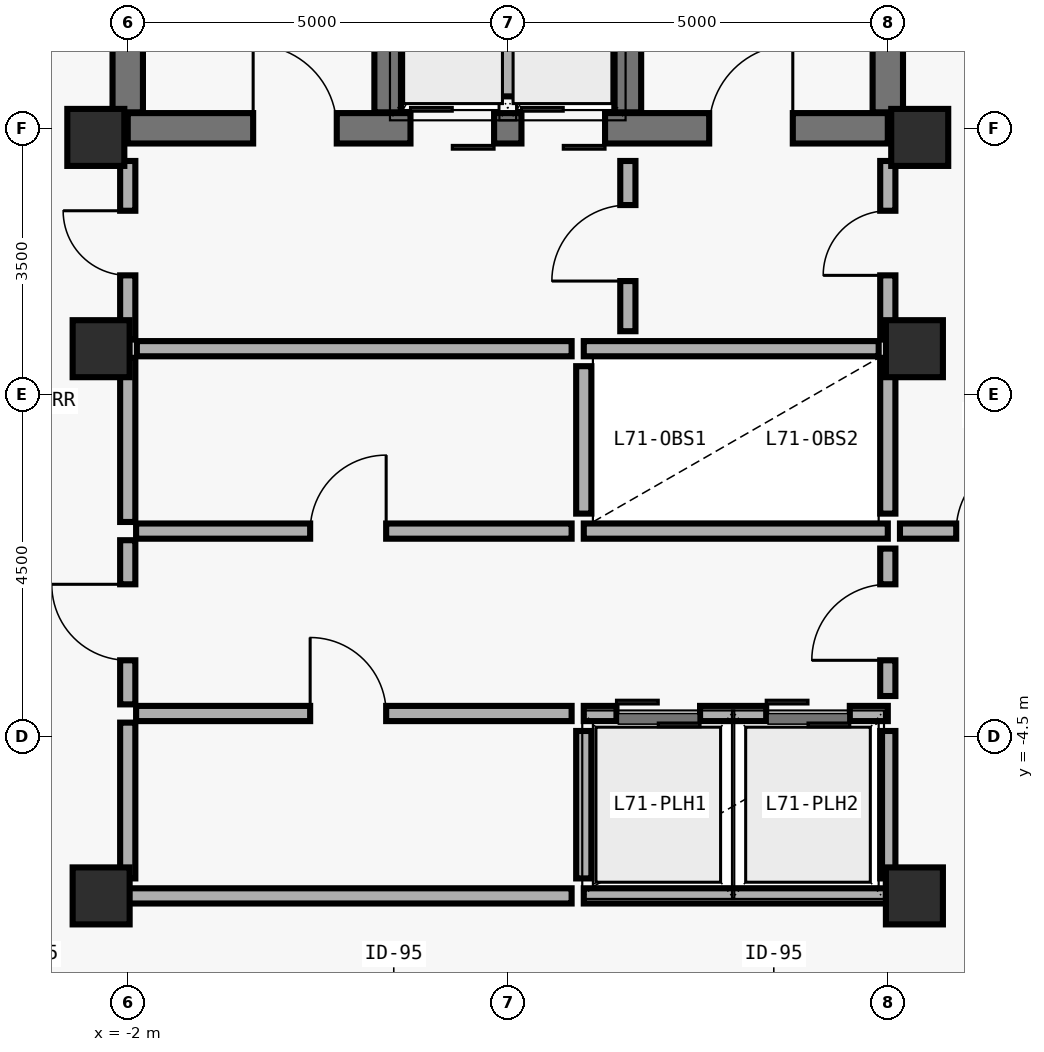
"""IFC4 building model, lengths in metres.
Left out: names, types, materials, properties, quantities, classifications, styles, units other than length and angle.
Written with IfcOpenShell. Run it as: python <this file> out.ifc"""

import sys

from ifc_helpers import new_model, si_unit, direction, frame, frame_2d, origin, origin_2d, place, context, subcontext, project, spatial, rectangle, extrude, element, fill, save


model = new_model("IFC4")
c1 = context("Model", 3, precision=1e-05, world=origin(), true_north=direction((0.0, 1.0)))
c2 = subcontext(c1, "Body", "Model", "MODEL_VIEW")
j1 = project(units=[si_unit("LENGTHUNIT", "METRE"), si_unit("PLANEANGLEUNIT", "RADIAN")], contexts=[c1])
p1 = place(None, origin())
s1 = spatial("IfcSite", under=j1, at=p1, CompositionType="ELEMENT")
p2 = place(p1, origin())
s2 = spatial("IfcBuilding", under=s1, at=p2, CompositionType="ELEMENT")
p3 = place(p2, frame((0.0, 0.0, 277.8)))
s3 = spatial("IfcBuildingStorey", under=s2, at=p3, CompositionType="ELEMENT", Elevation=277.8)
p4 = place(p3, frame((-2.0, 3.5, 0.0), z_axis=(0.0, 0.0, 1.0), x_axis=(1.0, 0.0, 0.0)))
e1 = element("IfcWall", 1, at=p4, inside=s3, PredefinedType="SHEAR", context=c2, shape_type="SweptSolid", body=[
    extrude(rectangle(XDim=10.0, YDim=0.4, at=frame_2d((5.0, 0.0))), origin(), (0.0, 0.0, 1.0), 3.592),
])
p5 = place(p4, frame((1.65, 0.0, 0.0)))
e2 = element("IfcOpeningElement", 2, at=p5, cuts=e1, PredefinedType="OPENING", context=c2, shape_type="SweptSolid", body=[
    extrude(rectangle(XDim=1.1, YDim=2.15, at=frame_2d((0.55, 1.075))), frame((0.0, 0.21, 0.0), z_axis=(0.0, -1.0, 0.0), x_axis=(1.0, 0.0, 0.0)), (0.0, 0.0, 1.0), 0.42),
])
p6 = place(p4, frame((7.65, 0.0, 0.0)))
e3 = element("IfcOpeningElement", 3, at=p6, cuts=e1, PredefinedType="OPENING", context=c2, shape_type="SweptSolid", body=[
    extrude(rectangle(XDim=1.1, YDim=2.15, at=frame_2d((0.55, 1.075))), frame((0.0, 0.21, 0.0), z_axis=(0.0, -1.0, 0.0), x_axis=(1.0, 0.0, 0.0)), (0.0, 0.0, 1.0), 0.42),
])
p7 = place(p4, frame((3.72, 0.0, 0.0)))
e4 = element("IfcOpeningElement", 4, at=p7, cuts=e1, PredefinedType="OPENING", context=c2, shape_type="SweptSolid", body=[
    extrude(rectangle(XDim=1.1, YDim=2.2, at=frame_2d((0.55, 1.1))), frame((0.0, 0.21, 0.0), z_axis=(0.0, -1.0, 0.0), x_axis=(1.0, 0.0, 0.0)), (0.0, 0.0, 1.0), 0.42),
])
p8 = place(p4, frame((5.18, 0.0, 0.0)))
e5 = element("IfcOpeningElement", 5, at=p8, cuts=e1, PredefinedType="OPENING", context=c2, shape_type="SweptSolid", body=[
    extrude(rectangle(XDim=1.1, YDim=2.2, at=frame_2d((0.55, 1.1))), frame((0.0, 0.21, 0.0), z_axis=(0.0, -1.0, 0.0), x_axis=(1.0, 0.0, 0.0)), (0.0, 0.0, 1.0), 0.42),
])
for number, where, z_axis, x_axis in (
    (6, (-2.0, 3.71, 0.0), (0.0, 0.0, 1.0), (0.0, 1.0, 0.0)),
    (7, (8.0, 3.71, 0.0), (0.0, 0.0, 1.0), (0.0, 1.0, 0.0)),
):
    element("IfcWall", number, at=place(p3, frame(where, z_axis=z_axis, x_axis=x_axis)), inside=s3, PredefinedType="SHEAR", context=c2, shape_type="SweptSolid", body=[
        extrude(rectangle(XDim=8.58, YDim=0.4, at=frame_2d((4.29, 0.0))), origin(), (0.0, 0.0, 1.0), 3.592),
    ])
for number, where, z_axis, x_axis in (
    (8, (1.42, 3.71, 0.0), (0.0, 0.0, 1.0), (0.0, 1.0, 0.0)),
    (9, (4.58, 3.71, 0.0), (0.0, 0.0, 1.0), (0.0, 1.0, 0.0)),
):
    element("IfcWall", number, at=place(p3, frame(where, z_axis=z_axis, x_axis=x_axis)), inside=s3, PredefinedType="SHEAR", context=c2, shape_type="SweptSolid", body=[
        extrude(rectangle(XDim=8.58, YDim=0.35, at=frame_2d((4.29, 0.0))), origin(), (0.0, 0.0, 1.0), 3.592),
    ])
for number, where, z_axis, x_axis in (
    (10, (-2.42, 3.38, 0.0), (0.0, 0.0, 1.0), (1.0, 0.0, 0.0)),
    (11, (8.42, 3.38, 0.0), (0.0, 0.0, 1.0), (1.0, 0.0, 0.0)),
    (12, (-2.35, 0.6, 0.0), (0.0, 0.0, 1.0), (1.0, 0.0, 0.0)),
    (13, (8.35, 0.6, 0.0), (0.0, 0.0, 1.0), (1.0, 0.0, 0.0)),
    (14, (-2.35, -6.6, 0.0), (0.0, 0.0, 1.0), (1.0, 0.0, 0.0)),
    (15, (8.35, -6.6, 0.0), (0.0, 0.0, 1.0), (1.0, 0.0, 0.0)),
):
    element("IfcColumn", number, at=place(p3, frame(where, z_axis=z_axis, x_axis=x_axis)), inside=s3, PredefinedType="COLUMN", context=c2, shape_type="SweptSolid", body=[
        extrude(rectangle(XDim=0.75, YDim=0.75, at=origin_2d()), origin(), (0.0, 0.0, 1.0), 3.575),
    ])
p9 = place(p3, frame((3.0, 3.92, 0.0), z_axis=(0.0, 0.0, 1.0), x_axis=(0.0, 1.0, 0.0)))
e16 = element("IfcWall", 16, at=p9, inside=s3, PredefinedType="SOLIDWALL", context=c2, shape_type="SweptSolid", body=[
    extrude(rectangle(XDim=2.03, YDim=0.2, at=frame_2d((1.015, 0.0))), origin(), (0.0, 0.0, 1.0), 3.36),
])
p10 = place(p3, frame((4.0, 0.6, 0.0), z_axis=(0.0, 0.0, 1.0), x_axis=(1.0, 0.0, 0.0)))
e17 = element("IfcWall", 17, at=p10, inside=s3, PredefinedType="SOLIDWALL", context=c2, shape_type="SweptSolid", body=[
    extrude(rectangle(XDim=3.88, YDim=0.2, at=frame_2d((1.94, 0.0))), origin(), (0.0, 0.0, 1.0), 3.072),
])
p11 = place(p3, frame((4.0, -1.8, 0.0), z_axis=(0.0, 0.0, 1.0), x_axis=(1.0, 0.0, 0.0)))
e18 = element("IfcWall", 18, at=p11, inside=s3, PredefinedType="SOLIDWALL", context=c2, shape_type="SweptSolid", body=[
    extrude(rectangle(XDim=4.0, YDim=0.2, at=frame_2d((2.0, 0.0))), origin(), (0.0, 0.0, 1.0), 3.36),
])
p12 = place(p3, frame((4.0, -1.57, 0.0), z_axis=(0.0, 0.0, 1.0), x_axis=(0.0, 1.0, 0.0)))
e19 = element("IfcWall", 19, at=p12, inside=s3, PredefinedType="SOLIDWALL", context=c2, shape_type="SweptSolid", body=[
    extrude(rectangle(XDim=1.94, YDim=0.2, at=frame_2d((0.97, 0.0))), origin(), (0.0, 0.0, 1.0), 3.36),
])
p13 = place(p3, frame((8.0, -1.57, 0.0), z_axis=(0.0, 0.0, 1.0), x_axis=(0.0, 1.0, 0.0)))
e20 = element("IfcWall", 20, at=p13, inside=s3, PredefinedType="SOLIDWALL", context=c2, shape_type="SweptSolid", body=[
    extrude(rectangle(XDim=2.05, YDim=0.2, at=frame_2d((1.025, 0.0))), origin(), (0.0, 0.0, 1.0), 3.072),
])
p14 = place(p3, frame((4.0, -4.2, 0.0), z_axis=(0.0, 0.0, 1.0), x_axis=(1.0, 0.0, 0.0)))
e21 = element("IfcWall", 21, at=p14, inside=s3, PredefinedType="SOLIDWALL", context=c2, shape_type="SweptSolid", body=[
    extrude(rectangle(XDim=4.0, YDim=0.2, at=frame_2d((2.0, 0.0))), origin(), (0.0, 0.0, 1.0), 3.36),
])
p15 = place(p14, frame((0.43, 0.0, 0.0)))
e22 = element("IfcOpeningElement", 22, at=p15, cuts=e21, PredefinedType="OPENING", context=c2, shape_type="SweptSolid", body=[
    extrude(rectangle(XDim=1.1, YDim=2.2, at=frame_2d((0.55, 1.1))), frame((0.0, 0.11, 0.0), z_axis=(0.0, -1.0, 0.0), x_axis=(1.0, 0.0, 0.0)), (0.0, 0.0, 1.0), 0.22),
])
p16 = place(p14, frame((2.4, 0.0, 0.0)))
e23 = element("IfcOpeningElement", 23, at=p16, cuts=e21, PredefinedType="OPENING", context=c2, shape_type="SweptSolid", body=[
    extrude(rectangle(XDim=1.1, YDim=2.2, at=frame_2d((0.55, 1.1))), frame((0.0, 0.11, 0.0), z_axis=(0.0, -1.0, 0.0), x_axis=(1.0, 0.0, 0.0)), (0.0, 0.0, 1.0), 0.22),
])
p17 = place(p3, frame((4.0, -6.6, 0.0), z_axis=(0.0, 0.0, 1.0), x_axis=(1.0, 0.0, 0.0)))
e24 = element("IfcWall", 24, at=p17, inside=s3, PredefinedType="SOLIDWALL", context=c2, shape_type="SweptSolid", body=[
    extrude(rectangle(XDim=4.0, YDim=0.2, at=frame_2d((2.0, 0.0))), origin(), (0.0, 0.0, 1.0), 3.072),
])
p18 = place(p3, frame((4.0, -6.37, 0.0), z_axis=(0.0, 0.0, 1.0), x_axis=(0.0, 1.0, 0.0)))
e25 = element("IfcWall", 25, at=p18, inside=s3, PredefinedType="SOLIDWALL", context=c2, shape_type="SweptSolid", body=[
    extrude(rectangle(XDim=1.94, YDim=0.2, at=frame_2d((0.97, 0.0))), origin(), (0.0, 0.0, 1.0), 3.36),
])
p19 = place(p3, frame((8.0, -6.37, 0.0), z_axis=(0.0, 0.0, 1.0), x_axis=(0.0, 1.0, 0.0)))
e26 = element("IfcWall", 26, at=p19, inside=s3, PredefinedType="SOLIDWALL", context=c2, shape_type="SweptSolid", body=[
    extrude(rectangle(XDim=1.94, YDim=0.2, at=frame_2d((0.97, 0.0))), origin(), (0.0, 0.0, 1.0), 3.072),
])
p20 = place(p3, frame((4.58, 0.83, 0.0), z_axis=(0.0, 0.0, 1.0), x_axis=(0.0, 1.0, 0.0)))
e27 = element("IfcWall", 27, at=p20, inside=s3, PredefinedType="MOVABLE", context=c2, shape_type="SweptSolid", body=[
    extrude(rectangle(XDim=2.24, YDim=0.2, at=frame_2d((1.12, 0.0))), origin(), (0.0, 0.0, 1.0), 3.36),
])
p21 = place(p20, frame((0.66, 0.0, 0.0)))
e28 = element("IfcOpeningElement", 28, at=p21, cuts=e27, PredefinedType="OPENING", context=c2, shape_type="SweptSolid", body=[
    extrude(rectangle(XDim=1.0, YDim=2.1, at=frame_2d((0.5, 1.05))), frame((0.0, 0.11, 0.0), z_axis=(0.0, -1.0, 0.0), x_axis=(1.0, 0.0, 0.0)), (0.0, 0.0, 1.0), 0.22),
])
p22 = place(p3, frame((-2.0, 0.72, 0.0), z_axis=(0.0, 0.0, 1.0), x_axis=(0.0, 1.0, 0.0)))
e29 = element("IfcWall", 29, at=p22, inside=s3, PredefinedType="MOVABLE", context=c2, shape_type="SweptSolid", body=[
    extrude(rectangle(XDim=2.35, YDim=0.2, at=frame_2d((1.175, 0.0))), origin(), (0.0, 0.0, 1.0), 2.692),
])
p23 = place(p22, frame((0.845, 0.0, 0.0)))
e30 = element("IfcOpeningElement", 30, at=p23, cuts=e29, PredefinedType="OPENING", context=c2, shape_type="SweptSolid", body=[
    extrude(rectangle(XDim=0.85, YDim=2.1, at=frame_2d((0.425, 1.05))), frame((0.0, 0.11, 0.0), z_axis=(0.0, -1.0, 0.0), x_axis=(1.0, 0.0, 0.0)), (0.0, 0.0, 1.0), 0.22),
])
p24 = place(p3, frame((8.0, 0.72, 0.0), z_axis=(0.0, 0.0, 1.0), x_axis=(0.0, 1.0, 0.0)))
e31 = element("IfcWall", 31, at=p24, inside=s3, PredefinedType="MOVABLE", context=c2, shape_type="SweptSolid", body=[
    extrude(rectangle(XDim=2.35, YDim=0.2, at=frame_2d((1.175, 0.0))), origin(), (0.0, 0.0, 1.0), 2.692),
])
p25 = place(p24, frame((0.845, 0.0, 0.0)))
e32 = element("IfcOpeningElement", 32, at=p25, cuts=e31, PredefinedType="OPENING", context=c2, shape_type="SweptSolid", body=[
    extrude(rectangle(XDim=0.85, YDim=2.1, at=frame_2d((0.425, 1.05))), frame((0.0, 0.11, 0.0), z_axis=(0.0, -1.0, 0.0), x_axis=(1.0, 0.0, 0.0)), (0.0, 0.0, 1.0), 0.22),
])
p26 = place(p3, frame((-2.0, -4.08, 0.0), z_axis=(0.0, 0.0, 1.0), x_axis=(0.0, 1.0, 0.0)))
e33 = element("IfcWall", 33, at=p26, inside=s3, PredefinedType="MOVABLE", context=c2, shape_type="SweptSolid", body=[
    extrude(rectangle(XDim=2.16, YDim=0.2, at=frame_2d((1.08, 0.0))), origin(), (0.0, 0.0, 1.0), 3.072),
])
p27 = place(p26, frame((0.58, 0.0, 0.0)))
e34 = element("IfcOpeningElement", 34, at=p27, cuts=e33, PredefinedType="OPENING", context=c2, shape_type="SweptSolid", body=[
    extrude(rectangle(XDim=1.0, YDim=2.1, at=frame_2d((0.5, 1.05))), frame((0.0, 0.11, 0.0), z_axis=(0.0, -1.0, 0.0), x_axis=(1.0, 0.0, 0.0)), (0.0, 0.0, 1.0), 0.22),
])
p28 = place(p3, frame((8.0, -3.97, 0.0), z_axis=(0.0, 0.0, 1.0), x_axis=(0.0, 1.0, 0.0)))
e35 = element("IfcWall", 35, at=p28, inside=s3, PredefinedType="MOVABLE", context=c2, shape_type="SweptSolid", body=[
    extrude(rectangle(XDim=1.94, YDim=0.2, at=frame_2d((0.97, 0.0))), origin(), (0.0, 0.0, 1.0), 3.072),
])
p29 = place(p28, frame((0.47, 0.0, 0.0)))
e36 = element("IfcOpeningElement", 36, at=p29, cuts=e35, PredefinedType="OPENING", context=c2, shape_type="SweptSolid", body=[
    extrude(rectangle(XDim=1.0, YDim=2.1, at=frame_2d((0.5, 1.05))), frame((0.0, 0.11, 0.0), z_axis=(0.0, -1.0, 0.0), x_axis=(1.0, 0.0, 0.0)), (0.0, 0.0, 1.0), 0.22),
])
p30 = place(p3, frame((-1.89, -1.8, 0.0), z_axis=(0.0, 0.0, 1.0), x_axis=(1.0, 0.0, 0.0)))
e37 = element("IfcWall", 37, at=p30, inside=s3, PredefinedType="MOVABLE", context=c2, shape_type="SweptSolid", body=[
    extrude(rectangle(XDim=5.73, YDim=0.2, at=frame_2d((2.865, 0.0))), origin(), (0.0, 0.0, 1.0), 3.36),
])
p31 = place(p30, frame((2.29, 0.0, 0.0)))
e38 = element("IfcOpeningElement", 38, at=p31, cuts=e37, PredefinedType="OPENING", context=c2, shape_type="SweptSolid", body=[
    extrude(rectangle(XDim=1.0, YDim=2.1, at=frame_2d((0.5, 1.05))), frame((0.0, 0.11, 0.0), z_axis=(0.0, -1.0, 0.0), x_axis=(1.0, 0.0, 0.0)), (0.0, 0.0, 1.0), 0.22),
])
p32 = place(p3, frame((-1.89, -4.2, 0.0), z_axis=(0.0, 0.0, 1.0), x_axis=(1.0, 0.0, 0.0)))
e39 = element("IfcWall", 39, at=p32, inside=s3, PredefinedType="MOVABLE", context=c2, shape_type="SweptSolid", body=[
    extrude(rectangle(XDim=5.73, YDim=0.2, at=frame_2d((2.865, 0.0))), origin(), (0.0, 0.0, 1.0), 3.36),
])
p33 = place(p32, frame((2.29, 0.0, 0.0)))
e40 = element("IfcOpeningElement", 40, at=p33, cuts=e39, PredefinedType="OPENING", context=c2, shape_type="SweptSolid", body=[
    extrude(rectangle(XDim=1.0, YDim=2.1, at=frame_2d((0.5, 1.05))), frame((0.0, 0.11, 0.0), z_axis=(0.0, -1.0, 0.0), x_axis=(1.0, 0.0, 0.0)), (0.0, 0.0, 1.0), 0.22),
])
p34 = place(p3, frame((8.16, -1.8, 0.0), z_axis=(0.0, 0.0, 1.0), x_axis=(1.0, 0.0, 0.0)))
e41 = element("IfcWall", 41, at=p34, inside=s3, PredefinedType="MOVABLE", context=c2, shape_type="SweptSolid", body=[
    extrude(rectangle(XDim=2.64, YDim=0.2, at=frame_2d((1.32, 0.0))), origin(), (0.0, 0.0, 1.0), 3.36),
])
p35 = place(p34, frame((0.74, 0.0, 0.0)))
e42 = element("IfcOpeningElement", 42, at=p35, cuts=e41, PredefinedType="OPENING", context=c2, shape_type="SweptSolid", body=[
    extrude(rectangle(XDim=1.0, YDim=2.1, at=frame_2d((0.5, 1.05))), frame((0.0, 0.11, 0.0), z_axis=(0.0, -1.0, 0.0), x_axis=(1.0, 0.0, 0.0)), (0.0, 0.0, 1.0), 0.22),
])
p36 = place(p3, frame((-1.88, 0.6, 0.0), z_axis=(0.0, 0.0, 1.0), x_axis=(1.0, 0.0, 0.0)))
e43 = element("IfcWall", 43, at=p36, inside=s3, PredefinedType="MOVABLE", context=c2, shape_type="SweptSolid", body=[
    extrude(rectangle(XDim=5.72, YDim=0.2, at=frame_2d((2.86, 0.0))), origin(), (0.0, 0.0, 1.0), 3.072),
])
p37 = place(p3, frame((-2.0, -1.68, 0.0), z_axis=(0.0, 0.0, 1.0), x_axis=(0.0, 1.0, 0.0)))
e44 = element("IfcWall", 44, at=p37, inside=s3, PredefinedType="MOVABLE", context=c2, shape_type="SweptSolid", body=[
    extrude(rectangle(XDim=2.16, YDim=0.2, at=frame_2d((1.08, 0.0))), origin(), (0.0, 0.0, 1.0), 3.072),
])
p38 = place(p3, frame((-2.0, -6.6, 0.0), z_axis=(0.0, 0.0, 1.0), x_axis=(1.0, 0.0, 0.0)))
e45 = element("IfcWall", 45, at=p38, inside=s3, PredefinedType="MOVABLE", context=c2, shape_type="SweptSolid", body=[
    extrude(rectangle(XDim=5.84, YDim=0.2, at=frame_2d((2.92, 0.0))), origin(), (0.0, 0.0, 1.0), 3.072),
])
p39 = place(p3, frame((-2.0, -6.37, 0.0), z_axis=(0.0, 0.0, 1.0), x_axis=(0.0, 1.0, 0.0)))
e46 = element("IfcWall", 46, at=p39, inside=s3, PredefinedType="MOVABLE", context=c2, shape_type="SweptSolid", body=[
    extrude(rectangle(XDim=2.05, YDim=0.2, at=frame_2d((1.025, 0.0))), origin(), (0.0, 0.0, 1.0), 3.072),
])
p40 = place(p5, origin())
e47 = element("IfcDoor", 47, at=p40, inside=s3, OperationType="SINGLE_SWING_LEFT", PredefinedType="DOOR", context=c2, shape_type="SweptSolid", body=[
    extrude(rectangle(XDim=1.1, YDim=2.15, at=frame_2d((0.55, 1.075))), frame((0.0, 0.025, 0.0), z_axis=(0.0, -1.0, 0.0), x_axis=(1.0, 0.0, 0.0)), (0.0, 0.0, 1.0), 0.05),
])
fill(e2, e47)
p41 = place(p6, origin())
e48 = element("IfcDoor", 48, at=p41, inside=s3, OperationType="SINGLE_SWING_RIGHT", PredefinedType="DOOR", context=c2, shape_type="SweptSolid", body=[
    extrude(rectangle(XDim=1.1, YDim=2.15, at=frame_2d((0.55, 1.075))), frame((0.0, 0.025, 0.0), z_axis=(0.0, -1.0, 0.0), x_axis=(1.0, 0.0, 0.0)), (0.0, 0.0, 1.0), 0.05),
])
fill(e3, e48)
p42 = place(p7, origin())
e49 = element("IfcDoor", 49, at=p42, inside=s3, OperationType="DOUBLE_DOOR_SLIDING", PredefinedType="DOOR", context=c2, shape_type="SweptSolid", body=[
    extrude(rectangle(XDim=1.1, YDim=2.2, at=frame_2d((0.55, 1.1))), frame((0.0, 0.025, 0.0), z_axis=(0.0, -1.0, 0.0), x_axis=(1.0, 0.0, 0.0)), (0.0, 0.0, 1.0), 0.05),
])
fill(e4, e49)
p43 = place(p8, origin())
e50 = element("IfcDoor", 50, at=p43, inside=s3, OperationType="DOUBLE_DOOR_SLIDING", PredefinedType="DOOR", context=c2, shape_type="SweptSolid", body=[
    extrude(rectangle(XDim=1.1, YDim=2.2, at=frame_2d((0.55, 1.1))), frame((0.0, 0.025, 0.0), z_axis=(0.0, -1.0, 0.0), x_axis=(1.0, 0.0, 0.0)), (0.0, 0.0, 1.0), 0.05),
])
fill(e5, e50)
p44 = place(p21, origin())
e51 = element("IfcDoor", 51, at=p44, inside=s3, OperationType="SINGLE_SWING_LEFT", PredefinedType="DOOR", context=c2, shape_type="SweptSolid", body=[
    extrude(rectangle(XDim=1.0, YDim=2.1, at=frame_2d((0.5, 1.05))), frame((0.0, 0.025, 0.0), z_axis=(0.0, -1.0, 0.0), x_axis=(1.0, 0.0, 0.0)), (0.0, 0.0, 1.0), 0.05),
])
fill(e28, e51)
p45 = place(p23, origin())
e52 = element("IfcDoor", 52, at=p45, inside=s3, OperationType="SINGLE_SWING_RIGHT", PredefinedType="DOOR", context=c2, shape_type="SweptSolid", body=[
    extrude(rectangle(XDim=0.85, YDim=2.1, at=frame_2d((0.425, 1.05))), frame((0.0, 0.025, 0.0), z_axis=(0.0, -1.0, 0.0), x_axis=(1.0, 0.0, 0.0)), (0.0, 0.0, 1.0), 0.05),
])
fill(e30, e52)
p46 = place(p25, origin())
e53 = element("IfcDoor", 53, at=p46, inside=s3, OperationType="SINGLE_SWING_LEFT", PredefinedType="DOOR", context=c2, shape_type="SweptSolid", body=[
    extrude(rectangle(XDim=0.85, YDim=2.1, at=frame_2d((0.425, 1.05))), frame((0.0, 0.025, 0.0), z_axis=(0.0, -1.0, 0.0), x_axis=(1.0, 0.0, 0.0)), (0.0, 0.0, 1.0), 0.05),
])
fill(e32, e53)
p47 = place(p27, origin())
e54 = element("IfcDoor", 54, at=p47, inside=s3, OperationType="SINGLE_SWING_RIGHT", PredefinedType="DOOR", context=c2, shape_type="SweptSolid", body=[
    extrude(rectangle(XDim=1.0, YDim=2.1, at=frame_2d((0.5, 1.05))), frame((0.0, 0.025, 0.0), z_axis=(0.0, -1.0, 0.0), x_axis=(1.0, 0.0, 0.0)), (0.0, 0.0, 1.0), 0.05),
])
fill(e34, e54)
p48 = place(p29, origin())
e55 = element("IfcDoor", 55, at=p48, inside=s3, OperationType="SINGLE_SWING_LEFT", PredefinedType="DOOR", context=c2, shape_type="SweptSolid", body=[
    extrude(rectangle(XDim=1.0, YDim=2.1, at=frame_2d((0.5, 1.05))), frame((0.0, 0.025, 0.0), z_axis=(0.0, -1.0, 0.0), x_axis=(1.0, 0.0, 0.0)), (0.0, 0.0, 1.0), 0.05),
])
fill(e36, e55)
p49 = place(p31, origin())
e56 = element("IfcDoor", 56, at=p49, inside=s3, OperationType="SINGLE_SWING_RIGHT", PredefinedType="DOOR", context=c2, shape_type="SweptSolid", body=[
    extrude(rectangle(XDim=1.0, YDim=2.1, at=frame_2d((0.5, 1.05))), frame((0.0, 0.025, 0.0), z_axis=(0.0, -1.0, 0.0), x_axis=(1.0, 0.0, 0.0)), (0.0, 0.0, 1.0), 0.05),
])
fill(e38, e56)
p50 = place(p33, origin())
e57 = element("IfcDoor", 57, at=p50, inside=s3, OperationType="SINGLE_SWING_LEFT", PredefinedType="DOOR", context=c2, shape_type="SweptSolid", body=[
    extrude(rectangle(XDim=1.0, YDim=2.1, at=frame_2d((0.5, 1.05))), frame((0.0, 0.025, 0.0), z_axis=(0.0, -1.0, 0.0), x_axis=(1.0, 0.0, 0.0)), (0.0, 0.0, 1.0), 0.05),
])
fill(e40, e57)
p51 = place(p35, origin())
e58 = element("IfcDoor", 58, at=p51, inside=s3, OperationType="SINGLE_SWING_RIGHT", PredefinedType="DOOR", context=c2, shape_type="SweptSolid", body=[
    extrude(rectangle(XDim=1.0, YDim=2.1, at=frame_2d((0.5, 1.05))), frame((0.0, 0.025, 0.0), z_axis=(0.0, -1.0, 0.0), x_axis=(1.0, 0.0, 0.0)), (0.0, 0.0, 1.0), 0.05),
])
fill(e42, e58)
p52 = place(p15, origin())
e59 = element("IfcDoor", 59, at=p52, inside=s3, OperationType="DOUBLE_DOOR_SLIDING", PredefinedType="DOOR", context=c2, shape_type="SweptSolid", body=[
    extrude(rectangle(XDim=1.1, YDim=2.2, at=frame_2d((0.55, 1.1))), frame((0.0, 0.025, 0.0), z_axis=(0.0, -1.0, 0.0), x_axis=(1.0, 0.0, 0.0)), (0.0, 0.0, 1.0), 0.05),
])
fill(e22, e59)
p53 = place(p16, origin())
e60 = element("IfcDoor", 60, at=p53, inside=s3, OperationType="DOUBLE_DOOR_SLIDING", PredefinedType="DOOR", context=c2, shape_type="SweptSolid", body=[
    extrude(rectangle(XDim=1.1, YDim=2.2, at=frame_2d((0.55, 1.1))), frame((0.0, 0.025, 0.0), z_axis=(0.0, -1.0, 0.0), x_axis=(1.0, 0.0, 0.0)), (0.0, 0.0, 1.0), 0.05),
])
fill(e23, e60)
save(model, sys.argv[1])
